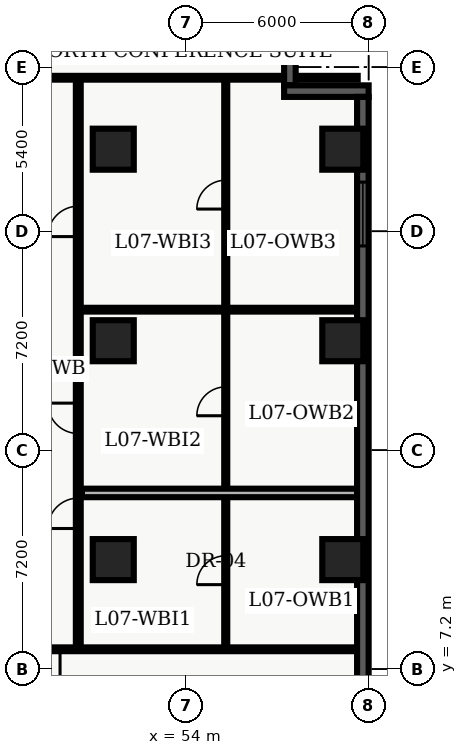
"""IFC4 building model, lengths in metres.
Left out: names, types, materials, properties, quantities, classifications, styles, units other than length and angle.
Written with IfcOpenShell. Run it as: python <this file> out.ifc"""

import sys

from ifc_helpers import new_model, entity, si_unit, converted_unit, direction, frame, origin_with_axes, origin_2d_with_axis, place, context, subcontext, project, spatial, polyline, rectangle, outline, extrude, element, fill, save


model = new_model("IFC4")
c1 = context("Model", 3, precision=1e-05, world=origin_with_axes(), true_north=direction((0.0, 1.0)))
c2 = subcontext(c1, "Body", "Model", "MODEL_VIEW")
j1 = project(units=[si_unit("LENGTHUNIT", "METRE"), converted_unit("PLANEANGLEUNIT", "DEGREE", entity("IfcPlaneAngleMeasure", 0.017), si_unit("PLANEANGLEUNIT", "RADIAN"), dimensions=[0, 0, 0, 0, 0, 0, 0])], contexts=[c1])
p1 = place(None, origin_with_axes())
s1 = spatial("IfcSite", under=j1, at=p1, CompositionType="ELEMENT")
p2 = place(p1, origin_with_axes())
s2 = spatial("IfcBuilding", under=s1, at=p2, CompositionType="ELEMENT")
p3 = place(p2, frame((0.0, 0.0, 32.7), z_axis=(0.0, 0.0, 1.0), x_axis=(1.0, 0.0, 0.0)))
s3 = spatial("IfcBuildingStorey", under=s2, at=p3, CompositionType="ELEMENT", Elevation=32.7)
for number, where, z_axis, x_axis in (
    (1, (51.6, 10.8, 0.0), (0.0, 0.0, 1.0), (1.0, 0.0, 0.0)),
    (2, (51.6, 18.0, 0.0), (0.0, 0.0, 1.0), (1.0, 0.0, 0.0)),
    (3, (51.6, 24.3, 0.0), (0.0, 0.0, 1.0), (1.0, 0.0, 0.0)),
    (4, (59.15, 10.8, 0.0), (0.0, 0.0, 1.0), (1.0, 0.0, 0.0)),
    (5, (59.15, 18.0, 0.0), (0.0, 0.0, 1.0), (1.0, 0.0, 0.0)),
    (6, (59.15, 24.3, 0.0), (0.0, 0.0, 1.0), (1.0, 0.0, 0.0)),
):
    element("IfcColumn", number, at=place(p3, frame(where, z_axis=z_axis, x_axis=x_axis)), inside=s3, PredefinedType="COLUMN", context=c2, shape_type="SweptSolid", body=[
        extrude(rectangle(XDim=1.35, YDim=1.35, at=origin_2d_with_axis()), origin_with_axes(), (0.0, 0.0, 1.0), 3.9),
    ])
p4 = place(p3, frame((50.45, 7.85, 0.0), z_axis=(0.0, 0.0, 1.0), x_axis=(0.0, 1.0, 0.0)))
e7 = element("IfcWall", 7, at=p4, inside=s3, PredefinedType="PARTITIONING", context=c2, shape_type="SweptSolid", body=[
    extrude(outline(polyline([(0.0, -0.08), (18.8, -0.08), (18.8, 0.08), (0.0, 0.08), (0.0, -0.08)])), origin_with_axes(), (0.0, 0.0, 1.0), 2.7),
])
p5 = place(p4, frame((4.473, 0.0, 0.0), z_axis=(0.0, 0.0, 1.0), x_axis=(1.0, 0.0, 0.0)))
e8 = element("IfcOpeningElement", 8, at=p5, cuts=e7, PredefinedType="OPENING", context=c2, shape_type="SweptSolid", body=[
    extrude(rectangle(XDim=1.0, YDim=0.18, at=origin_2d_with_axis()), origin_with_axes(), (0.0, 0.0, 1.0), 2.15),
])
p6 = place(p4, frame((7.597, 0.0, 0.0), z_axis=(0.0, 0.0, 1.0), x_axis=(1.0, 0.0, 0.0)))
e9 = element("IfcOpeningElement", 9, at=p6, cuts=e7, PredefinedType="OPENING", context=c2, shape_type="SweptSolid", body=[
    extrude(rectangle(XDim=1.0, YDim=0.18, at=origin_2d_with_axis()), origin_with_axes(), (0.0, 0.0, 1.0), 2.15),
])
p7 = place(p4, frame((14.075, 0.0, 0.0), z_axis=(0.0, 0.0, 1.0), x_axis=(1.0, 0.0, 0.0)))
e10 = element("IfcOpeningElement", 10, at=p7, cuts=e7, PredefinedType="OPENING", context=c2, shape_type="SweptSolid", body=[
    extrude(rectangle(XDim=1.0, YDim=0.18, at=origin_2d_with_axis()), origin_with_axes(), (0.0, 0.0, 1.0), 2.15),
])
p8 = place(p3, frame((59.64, 7.85, 0.0), z_axis=(0.0, 0.0, 1.0), x_axis=(-1.0, 0.0, 0.0)))
e11 = element("IfcWall", 11, at=p8, inside=s3, PredefinedType="PARTITIONING", context=c2, shape_type="SweptSolid", body=[
    extrude(outline(polyline([(0.0, -0.062), (11.59, -0.062), (11.59, 0.062), (0.0, 0.062), (0.0, -0.062)])), origin_with_axes(), (0.0, 0.0, 1.0), 2.7),
])
p9 = place(p8, frame((10.29, 0.0, 0.0), z_axis=(0.0, 0.0, 1.0), x_axis=(1.0, 0.0, 0.0)))
e12 = element("IfcOpeningElement", 12, at=p9, cuts=e11, PredefinedType="OPENING", context=c2, shape_type="SweptSolid", body=[
    extrude(rectangle(XDim=1.0, YDim=0.145, at=origin_2d_with_axis()), origin_with_axes(), (0.0, 0.0, 1.0), 2.15),
])
p10 = place(p3, frame((38.76, 26.65, 0.0), z_axis=(0.0, 0.0, 1.0), x_axis=(1.0, 0.0, 0.0)))
e13 = element("IfcWall", 13, at=p10, inside=s3, PredefinedType="PARTITIONING", context=c2, shape_type="SweptSolid", body=[
    extrude(outline(polyline([(0.0, -0.062), (20.88, -0.062), (20.88, 0.062), (0.0, 0.062), (0.0, -0.062)])), origin_with_axes(), (0.0, 0.0, 1.0), 2.7),
])
p11 = place(p10, frame((4.24, 0.0, 0.0), z_axis=(0.0, 0.0, 1.0), x_axis=(1.0, 0.0, 0.0)))
e14 = element("IfcOpeningElement", 14, at=p11, cuts=e13, PredefinedType="OPENING", context=c2, shape_type="SweptSolid", body=[
    extrude(rectangle(XDim=1.0, YDim=0.145, at=origin_2d_with_axis()), origin_with_axes(), (0.0, 0.0, 1.0), 2.15),
])
p12 = place(p3, frame((55.3, 7.98, 0.0), z_axis=(0.0, 0.0, 1.0), x_axis=(0.0, 1.0, 0.0)))
e15 = element("IfcWall", 15, at=p12, inside=s3, PredefinedType="PARTITIONING", context=c2, shape_type="SweptSolid", body=[
    extrude(outline(polyline([(0.0, -0.05), (18.54, -0.05), (18.54, 0.05), (0.0, 0.05), (0.0, -0.05)])), origin_with_axes(), (0.0, 0.0, 1.0), 2.7),
])
p13 = place(p12, frame((2.471, 0.0, 0.0), z_axis=(0.0, 0.0, 1.0), x_axis=(1.0, 0.0, 0.0)))
e16 = element("IfcOpeningElement", 16, at=p13, cuts=e15, PredefinedType="OPENING", context=c2, shape_type="SweptSolid", body=[
    extrude(rectangle(XDim=0.95, YDim=0.12, at=origin_2d_with_axis()), origin_with_axes(), (0.0, 0.0, 1.0), 2.15),
])
p14 = place(p12, frame((8.027, 0.0, 0.0), z_axis=(0.0, 0.0, 1.0), x_axis=(1.0, 0.0, 0.0)))
e17 = element("IfcOpeningElement", 17, at=p14, cuts=e15, PredefinedType="OPENING", context=c2, shape_type="SweptSolid", body=[
    extrude(rectangle(XDim=0.95, YDim=0.12, at=origin_2d_with_axis()), origin_with_axes(), (0.0, 0.0, 1.0), 2.15),
])
p15 = place(p12, frame((14.825, 0.0, 0.0), z_axis=(0.0, 0.0, 1.0), x_axis=(1.0, 0.0, 0.0)))
e18 = element("IfcOpeningElement", 18, at=p15, cuts=e15, PredefinedType="OPENING", context=c2, shape_type="SweptSolid", body=[
    extrude(rectangle(XDim=0.95, YDim=0.12, at=origin_2d_with_axis()), origin_with_axes(), (0.0, 0.0, 1.0), 2.15),
])
p16 = place(p3, frame((50.57, 12.993, 0.0), z_axis=(0.0, 0.0, 1.0), x_axis=(1.0, 0.0, 0.0)))
e19 = element("IfcWall", 19, at=p16, inside=s3, PredefinedType="PARTITIONING", context=c2, shape_type="SweptSolid", body=[
    extrude(outline(polyline([(0.0, -0.14), (9.055, -0.14), (9.055, 0.14), (0.0, 0.14), (0.0, -0.14)])), origin_with_axes(), (0.0, 0.0, 1.0), 2.7),
])
p17 = place(p3, frame((50.57, 19.021, 0.0), z_axis=(0.0, 0.0, 1.0), x_axis=(1.0, 0.0, 0.0)))
e20 = element("IfcWall", 20, at=p17, inside=s3, PredefinedType="PARTITIONING", context=c2, shape_type="SweptSolid", body=[
    extrude(outline(polyline([(0.0, -0.062), (9.055, -0.062), (9.055, 0.062), (0.0, 0.062), (0.0, -0.062)])), origin_with_axes(), (0.0, 0.0, 1.0), 2.7),
])
p18 = place(p3, frame((57.41, 28.42, 0.0), z_axis=(0.0, 0.0, 1.0), x_axis=(0.0, -1.0, 0.0)))
e21 = element("IfcWall", 21, at=p18, inside=s3, PredefinedType="SOLIDWALL", context=c2, shape_type="SweptSolid", body=[
    extrude(outline(polyline([(0.0, -0.19), (2.02, -0.19), (2.02, 0.19), (0.0, 0.19), (0.0, -0.19)])), origin_with_axes(), (0.0, 0.0, 1.0), 3.66),
])
p19 = place(p3, frame((57.22, 26.21, 0.0), z_axis=(0.0, 0.0, 1.0), x_axis=(1.0, 0.0, 0.0)))
e22 = element("IfcWall", 22, at=p19, inside=s3, PredefinedType="SOLIDWALL", context=c2, shape_type="SweptSolid", body=[
    extrude(outline(polyline([(0.0, -0.19), (2.78, -0.19), (2.78, 0.19), (0.0, 0.19), (0.0, -0.19)])), origin_with_axes(), (0.0, 0.0, 1.0), 3.66),
])
p20 = place(p3, frame((59.81, 26.02, 0.0), z_axis=(0.0, 0.0, 1.0), x_axis=(0.0, -1.0, 0.0)))
e23 = element("IfcWall", 23, at=p20, inside=s3, PredefinedType="SOLIDWALL", context=c2, shape_type="SweptSolid", body=[
    extrude(outline(polyline([(0.0, -0.19), (23.62, -0.19), (23.62, 0.19), (0.0, 0.19), (0.0, -0.19)])), origin_with_axes(), (0.0, 0.0, 1.0), 3.66),
])
p21 = place(p20, frame((3.853, 0.0, 0.45), z_axis=(0.0, 0.0, 1.0), x_axis=(1.0, 0.0, 0.0)))
e24 = element("IfcOpeningElement", 24, at=p21, cuts=e23, PredefinedType="OPENING", context=c2, shape_type="SweptSolid", body=[
    extrude(rectangle(XDim=2.1, YDim=0.4, at=origin_2d_with_axis()), origin_with_axes(), (0.0, 0.0, 1.0), 2.2),
])
p22 = place(p20, frame((20.218, 0.0, 0.45), z_axis=(0.0, 0.0, 1.0), x_axis=(1.0, 0.0, 0.0)))
e25 = element("IfcOpeningElement", 25, at=p22, cuts=e23, PredefinedType="OPENING", context=c2, shape_type="SweptSolid", body=[
    extrude(rectangle(XDim=2.1, YDim=0.4, at=origin_2d_with_axis()), origin_with_axes(), (0.0, 0.0, 1.0), 2.2),
])
p23 = place(p8, frame((10.29, 0.0, 0.0), z_axis=(0.0, 0.0, 1.0), x_axis=(1.0, 0.0, 0.0)))
e26 = element("IfcDoor", 26, at=p23, inside=s3, OperationType="SINGLE_SWING_LEFT", PredefinedType="DOOR", context=c2, shape_type="SweptSolid", body=[
    extrude(rectangle(XDim=1.0, YDim=0.075, at=origin_2d_with_axis()), origin_with_axes(), (0.0, 0.0, 1.0), 2.15),
])
fill(e12, e26)
p24 = place(p12, frame((2.471, 0.0, 0.0), z_axis=(0.0, 0.0, 1.0), x_axis=(1.0, 0.0, 0.0)))
e27 = element("IfcDoor", 27, at=p24, inside=s3, OperationType="SINGLE_SWING_LEFT", PredefinedType="DOOR", context=c2, shape_type="SweptSolid", body=[
    extrude(rectangle(XDim=0.95, YDim=0.06, at=origin_2d_with_axis()), origin_with_axes(), (0.0, 0.0, 1.0), 2.15),
])
fill(e16, e27)
p25 = place(p4, frame((4.473, 0.0, 0.0), z_axis=(0.0, 0.0, 1.0), x_axis=(1.0, 0.0, 0.0)))
e28 = element("IfcDoor", 28, at=p25, inside=s3, OperationType="SINGLE_SWING_LEFT", PredefinedType="DOOR", context=c2, shape_type="SweptSolid", body=[
    extrude(rectangle(XDim=1.0, YDim=0.09, at=origin_2d_with_axis()), origin_with_axes(), (0.0, 0.0, 1.0), 2.15),
])
fill(e8, e28)
p26 = place(p12, frame((8.027, 0.0, 0.0), z_axis=(0.0, 0.0, 1.0), x_axis=(1.0, 0.0, 0.0)))
e29 = element("IfcDoor", 29, at=p26, inside=s3, OperationType="SINGLE_SWING_LEFT", PredefinedType="DOOR", context=c2, shape_type="SweptSolid", body=[
    extrude(rectangle(XDim=0.95, YDim=0.06, at=origin_2d_with_axis()), origin_with_axes(), (0.0, 0.0, 1.0), 2.15),
])
fill(e17, e29)
p27 = place(p4, frame((7.597, 0.0, 0.0), z_axis=(0.0, 0.0, 1.0), x_axis=(1.0, 0.0, 0.0)))
e30 = element("IfcDoor", 30, at=p27, inside=s3, OperationType="SINGLE_SWING_RIGHT", PredefinedType="DOOR", context=c2, shape_type="SweptSolid", body=[
    extrude(rectangle(XDim=1.0, YDim=0.09, at=origin_2d_with_axis()), origin_with_axes(), (0.0, 0.0, 1.0), 2.15),
])
fill(e9, e30)
p28 = place(p12, frame((14.825, 0.0, 0.0), z_axis=(0.0, 0.0, 1.0), x_axis=(1.0, 0.0, 0.0)))
e31 = element("IfcDoor", 31, at=p28, inside=s3, OperationType="SINGLE_SWING_LEFT", PredefinedType="DOOR", context=c2, shape_type="SweptSolid", body=[
    extrude(rectangle(XDim=0.95, YDim=0.06, at=origin_2d_with_axis()), origin_with_axes(), (0.0, 0.0, 1.0), 2.15),
])
fill(e18, e31)
p29 = place(p4, frame((14.075, 0.0, 0.0), z_axis=(0.0, 0.0, 1.0), x_axis=(1.0, 0.0, 0.0)))
e32 = element("IfcDoor", 32, at=p29, inside=s3, OperationType="SINGLE_SWING_LEFT", PredefinedType="DOOR", context=c2, shape_type="SweptSolid", body=[
    extrude(rectangle(XDim=1.0, YDim=0.09, at=origin_2d_with_axis()), origin_with_axes(), (0.0, 0.0, 1.0), 2.15),
])
fill(e10, e32)
p30 = place(p20, frame((3.853, 0.0, 0.45), z_axis=(0.0, 0.0, 1.0), x_axis=(1.0, 0.0, 0.0)))
e33 = element("IfcWindow", 33, at=p30, inside=s3, PredefinedType="WINDOW", context=c2, shape_type="SweptSolid", body=[
    extrude(rectangle(XDim=2.1, YDim=0.09, at=origin_2d_with_axis()), origin_with_axes(), (0.0, 0.0, 1.0), 2.2),
])
fill(e24, e33)
save(model, sys.argv[1])
